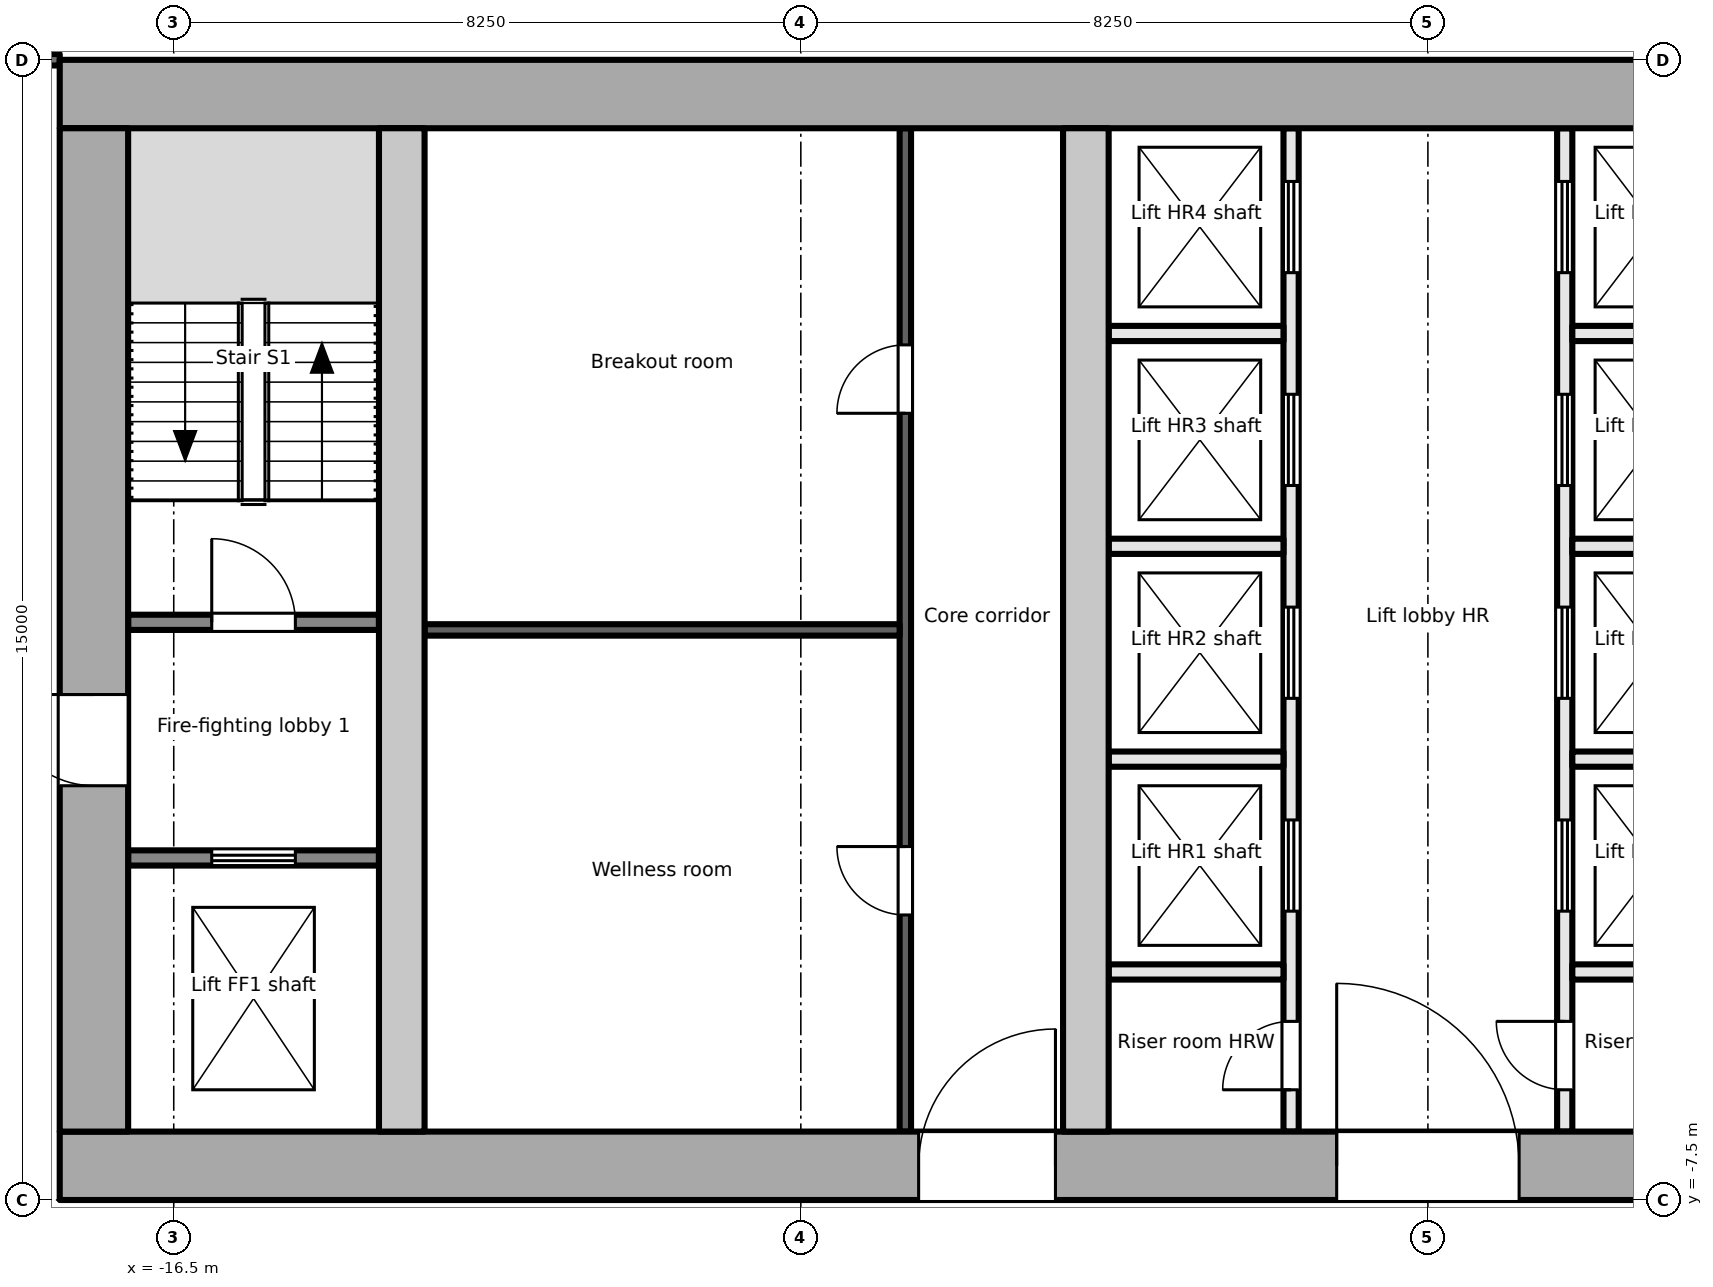
"""IFC4 building model, lengths in metres.
Left out: names, types, materials, properties, quantities, classifications, styles, units other than length and angle.
Written with IfcOpenShell. Run it as: python <this file> out.ifc"""

import sys

from ifc_helpers import new_model, si_unit, direction, frame, frame_2d, origin, place, context, subcontext, project, spatial, rectangle, extrude, element, fill, save


model = new_model("IFC4")
c1 = context("Model", 3, precision=1e-05, world=origin(), true_north=direction((0.0, 1.0)))
c2 = subcontext(c1, "Body", "Model", "MODEL_VIEW")
j1 = project(units=[si_unit("LENGTHUNIT", "METRE"), si_unit("PLANEANGLEUNIT", "RADIAN")], contexts=[c1])
p1 = place(None, origin())
s1 = spatial("IfcSite", under=j1, at=p1, CompositionType="ELEMENT")
p2 = place(p1, origin())
s2 = spatial("IfcBuilding", under=s1, at=p2, CompositionType="ELEMENT")
p3 = place(p2, frame((0.0, 0.0, 270.7)))
s3 = spatial("IfcBuildingStorey", under=s2, at=p3, CompositionType="ELEMENT", Elevation=270.7)
p4 = place(p3, frame((-18.0, -7.05, -0.2), z_axis=(0.0, 0.0, 1.0), x_axis=(1.0, 0.0, 0.0)))
e1 = element("IfcWall", 1, at=p4, inside=s3, PredefinedType="SHEAR", context=c2, shape_type="SweptSolid", body=[
    extrude(rectangle(XDim=36.0, YDim=0.9, at=frame_2d((18.0, 0.0))), origin(), (0.0, 0.0, 1.0), 3.9),
])
p5 = place(p4, frame((11.3, 0.0, 0.2)))
e2 = element("IfcOpeningElement", 2, at=p5, cuts=e1, PredefinedType="OPENING", context=c2, shape_type="SweptSolid", body=[
    extrude(rectangle(XDim=1.8, YDim=2.1, at=frame_2d((0.9, 1.05))), frame((0.0, 0.46, 0.0), z_axis=(0.0, -1.0, 0.0), x_axis=(1.0, 0.0, 0.0)), (0.0, 0.0, 1.0), 0.921),
])
p6 = place(p4, frame((16.8, 0.0, 0.2)))
e3 = element("IfcOpeningElement", 3, at=p6, cuts=e1, PredefinedType="OPENING", context=c2, shape_type="SweptSolid", body=[
    extrude(rectangle(XDim=2.4, YDim=2.1, at=frame_2d((1.2, 1.05))), frame((0.0, 0.46, 0.0), z_axis=(0.0, -1.0, 0.0), x_axis=(1.0, 0.0, 0.0)), (0.0, 0.0, 1.0), 0.921),
])
p7 = place(p4, frame((26.1, 0.0, 0.2)))
e4 = element("IfcOpeningElement", 4, at=p7, cuts=e1, PredefinedType="OPENING", context=c2, shape_type="SweptSolid", body=[
    extrude(rectangle(XDim=2.4, YDim=2.1, at=frame_2d((1.2, 1.05))), frame((0.0, 0.46, 0.0), z_axis=(0.0, -1.0, 0.0), x_axis=(1.0, 0.0, 0.0)), (0.0, 0.0, 1.0), 0.921),
])
p8 = place(p3, frame((-18.0, 7.05, -0.2), z_axis=(0.0, 0.0, 1.0), x_axis=(1.0, 0.0, 0.0)))
e5 = element("IfcWall", 5, at=p8, inside=s3, PredefinedType="SHEAR", context=c2, shape_type="SweptSolid", body=[
    extrude(rectangle(XDim=36.0, YDim=0.9, at=frame_2d((18.0, 0.0))), origin(), (0.0, 0.0, 1.0), 3.9),
])
p9 = place(p3, frame((-17.55, -6.6, -0.2), z_axis=(0.0, 0.0, 1.0), x_axis=(0.0, 1.0, 0.0)))
e6 = element("IfcWall", 6, at=p9, inside=s3, PredefinedType="SHEAR", context=c2, shape_type="SweptSolid", body=[
    extrude(rectangle(XDim=13.2, YDim=0.9, at=frame_2d((6.6, 0.0))), origin(), (0.0, 0.0, 1.0), 3.9),
])
p10 = place(p9, frame((4.55, 0.0, 0.2)))
e7 = element("IfcOpeningElement", 7, at=p10, cuts=e6, PredefinedType="OPENING", context=c2, shape_type="SweptSolid", body=[
    extrude(rectangle(XDim=1.2, YDim=2.1, at=frame_2d((0.6, 1.05))), frame((0.0, 0.46, 0.0), z_axis=(0.0, -1.0, 0.0), x_axis=(1.0, 0.0, 0.0)), (0.0, 0.0, 1.0), 0.921),
])
for number, where, z_axis, x_axis in (
    (8, (-13.5, -6.6, -0.2), (0.0, 0.0, 1.0), (0.0, 1.0, 0.0)),
    (9, (-4.5, -6.6, -0.2), (0.0, 0.0, 1.0), (0.0, 1.0, 0.0)),
):
    element("IfcWall", number, at=place(p3, frame(where, z_axis=z_axis, x_axis=x_axis)), inside=s3, PredefinedType="SHEAR", context=c2, shape_type="SweptSolid", body=[
        extrude(rectangle(XDim=13.2, YDim=0.6, at=frame_2d((6.6, 0.0))), origin(), (0.0, 0.0, 1.0), 3.9),
    ])
p11 = place(p3, frame((-17.1, -3.0, 0.0), z_axis=(0.0, 0.0, 1.0), x_axis=(1.0, 0.0, 0.0)))
e10 = element("IfcWall", 10, at=p11, inside=s3, PredefinedType="PARTITIONING", context=c2, shape_type="SweptSolid", body=[
    extrude(rectangle(XDim=3.3, YDim=0.2, at=frame_2d((1.65, 0.0))), origin(), (0.0, 0.0, 1.0), 3.7),
])
p12 = place(p11, frame((1.1, 0.0, 0.0)))
e11 = element("IfcOpeningElement", 11, at=p12, cuts=e10, PredefinedType="OPENING", context=c2, shape_type="SweptSolid", body=[
    extrude(rectangle(XDim=1.1, YDim=2.1, at=frame_2d((0.55, 1.05))), frame((0.0, 0.111, 0.0), z_axis=(0.0, -1.0, 0.0), x_axis=(1.0, 0.0, 0.0)), (0.0, 0.0, 1.0), 0.221),
])
p13 = place(p3, frame((-17.1, 0.1, 0.0), z_axis=(0.0, 0.0, 1.0), x_axis=(1.0, 0.0, 0.0)))
e12 = element("IfcWall", 12, at=p13, inside=s3, PredefinedType="PARTITIONING", context=c2, shape_type="SweptSolid", body=[
    extrude(rectangle(XDim=3.3, YDim=0.2, at=frame_2d((1.65, 0.0))), origin(), (0.0, 0.0, 1.0), 3.7),
])
p14 = place(p13, frame((1.1, 0.0, 0.0)))
e13 = element("IfcOpeningElement", 13, at=p14, cuts=e12, PredefinedType="OPENING", context=c2, shape_type="SweptSolid", body=[
    extrude(rectangle(XDim=1.1, YDim=2.1, at=frame_2d((0.55, 1.05))), frame((0.0, 0.111, 0.0), z_axis=(0.0, -1.0, 0.0), x_axis=(1.0, 0.0, 0.0)), (0.0, 0.0, 1.0), 0.221),
])
p15 = place(p3, frame((-6.875, -6.6, 0.0), z_axis=(0.0, 0.0, 1.0), x_axis=(0.0, 1.0, 0.0)))
e14 = element("IfcWall", 14, at=p15, inside=s3, PredefinedType="PARTITIONING", context=c2, shape_type="SweptSolid", body=[
    extrude(rectangle(XDim=13.2, YDim=0.15, at=frame_2d((6.6, 0.0))), origin(), (0.0, 0.0, 1.0), 3.7),
])
p16 = place(p15, frame((2.85, 0.0, 0.0)))
e15 = element("IfcOpeningElement", 15, at=p16, cuts=e14, PredefinedType="OPENING", context=c2, shape_type="SweptSolid", body=[
    extrude(rectangle(XDim=0.9, YDim=2.1, at=frame_2d((0.45, 1.05))), frame((0.0, 0.085, 0.0), z_axis=(0.0, -1.0, 0.0), x_axis=(1.0, 0.0, 0.0)), (0.0, 0.0, 1.0), 0.171),
])
p17 = place(p15, frame((9.45, 0.0, 0.0)))
e16 = element("IfcOpeningElement", 16, at=p17, cuts=e14, PredefinedType="OPENING", context=c2, shape_type="SweptSolid", body=[
    extrude(rectangle(XDim=0.9, YDim=2.1, at=frame_2d((0.45, 1.05))), frame((0.0, 0.085, 0.0), z_axis=(0.0, -1.0, 0.0), x_axis=(1.0, 0.0, 0.0)), (0.0, 0.0, 1.0), 0.171),
])
p18 = place(p3, frame((-13.2, 0.0, 0.0), z_axis=(0.0, 0.0, 1.0), x_axis=(1.0, 0.0, 0.0)))
e17 = element("IfcWall", 17, at=p18, inside=s3, PredefinedType="PARTITIONING", context=c2, shape_type="SweptSolid", body=[
    extrude(rectangle(XDim=6.25, YDim=0.15, at=frame_2d((3.125, 0.0))), origin(), (0.0, 0.0, 1.0), 3.7),
])
p19 = place(p3, frame((-1.8, -6.6, 0.0), z_axis=(0.0, 0.0, 1.0), x_axis=(0.0, 1.0, 0.0)))
e18 = element("IfcWall", 18, at=p19, inside=s3, PredefinedType="PARTITIONING", context=c2, shape_type="SweptSolid", body=[
    extrude(rectangle(XDim=13.2, YDim=0.2, at=frame_2d((6.6, 0.0))), origin(), (0.0, 0.0, 1.0), 3.7),
])
p20 = place(p19, frame((0.55, 0.0, 0.0)))
e19 = element("IfcOpeningElement", 19, at=p20, cuts=e18, PredefinedType="OPENING", context=c2, shape_type="SweptSolid", body=[
    extrude(rectangle(XDim=0.9, YDim=2.1, at=frame_2d((0.45, 1.05))), frame((0.0, 0.111, 0.0), z_axis=(0.0, -1.0, 0.0), x_axis=(1.0, 0.0, 0.0)), (0.0, 0.0, 1.0), 0.221),
])
p21 = place(p19, frame((2.9, 0.0, 0.0)))
e20 = element("IfcOpeningElement", 20, at=p21, cuts=e18, PredefinedType="OPENING", context=c2, shape_type="SweptSolid", body=[
    extrude(rectangle(XDim=1.2, YDim=2.1, at=frame_2d((0.6, 1.05))), frame((0.0, 0.111, 0.0), z_axis=(0.0, -1.0, 0.0), x_axis=(1.0, 0.0, 0.0)), (0.0, 0.0, 1.0), 0.221),
])
p22 = place(p19, frame((5.7, 0.0, 0.0)))
e21 = element("IfcOpeningElement", 21, at=p22, cuts=e18, PredefinedType="OPENING", context=c2, shape_type="SweptSolid", body=[
    extrude(rectangle(XDim=1.2, YDim=2.1, at=frame_2d((0.6, 1.05))), frame((0.0, 0.111, 0.0), z_axis=(0.0, -1.0, 0.0), x_axis=(1.0, 0.0, 0.0)), (0.0, 0.0, 1.0), 0.221),
])
p23 = place(p19, frame((8.5, 0.0, 0.0)))
e22 = element("IfcOpeningElement", 22, at=p23, cuts=e18, PredefinedType="OPENING", context=c2, shape_type="SweptSolid", body=[
    extrude(rectangle(XDim=1.2, YDim=2.1, at=frame_2d((0.6, 1.05))), frame((0.0, 0.111, 0.0), z_axis=(0.0, -1.0, 0.0), x_axis=(1.0, 0.0, 0.0)), (0.0, 0.0, 1.0), 0.221),
])
p24 = place(p19, frame((11.3, 0.0, 0.0)))
e23 = element("IfcOpeningElement", 23, at=p24, cuts=e18, PredefinedType="OPENING", context=c2, shape_type="SweptSolid", body=[
    extrude(rectangle(XDim=1.2, YDim=2.1, at=frame_2d((0.6, 1.05))), frame((0.0, 0.111, 0.0), z_axis=(0.0, -1.0, 0.0), x_axis=(1.0, 0.0, 0.0)), (0.0, 0.0, 1.0), 0.221),
])
p25 = place(p3, frame((1.8, -6.6, 0.0), z_axis=(0.0, 0.0, 1.0), x_axis=(0.0, 1.0, 0.0)))
e24 = element("IfcWall", 24, at=p25, inside=s3, PredefinedType="PARTITIONING", context=c2, shape_type="SweptSolid", body=[
    extrude(rectangle(XDim=13.2, YDim=0.2, at=frame_2d((6.6, 0.0))), origin(), (0.0, 0.0, 1.0), 3.7),
])
p26 = place(p25, frame((0.55, 0.0, 0.0)))
e25 = element("IfcOpeningElement", 25, at=p26, cuts=e24, PredefinedType="OPENING", context=c2, shape_type="SweptSolid", body=[
    extrude(rectangle(XDim=0.9, YDim=2.1, at=frame_2d((0.45, 1.05))), frame((0.0, 0.111, 0.0), z_axis=(0.0, -1.0, 0.0), x_axis=(1.0, 0.0, 0.0)), (0.0, 0.0, 1.0), 0.221),
])
p27 = place(p25, frame((2.9, 0.0, 0.0)))
e26 = element("IfcOpeningElement", 26, at=p27, cuts=e24, PredefinedType="OPENING", context=c2, shape_type="SweptSolid", body=[
    extrude(rectangle(XDim=1.2, YDim=2.1, at=frame_2d((0.6, 1.05))), frame((0.0, 0.111, 0.0), z_axis=(0.0, -1.0, 0.0), x_axis=(1.0, 0.0, 0.0)), (0.0, 0.0, 1.0), 0.221),
])
p28 = place(p25, frame((5.7, 0.0, 0.0)))
e27 = element("IfcOpeningElement", 27, at=p28, cuts=e24, PredefinedType="OPENING", context=c2, shape_type="SweptSolid", body=[
    extrude(rectangle(XDim=1.2, YDim=2.1, at=frame_2d((0.6, 1.05))), frame((0.0, 0.111, 0.0), z_axis=(0.0, -1.0, 0.0), x_axis=(1.0, 0.0, 0.0)), (0.0, 0.0, 1.0), 0.221),
])
p29 = place(p25, frame((8.5, 0.0, 0.0)))
e28 = element("IfcOpeningElement", 28, at=p29, cuts=e24, PredefinedType="OPENING", context=c2, shape_type="SweptSolid", body=[
    extrude(rectangle(XDim=1.2, YDim=2.1, at=frame_2d((0.6, 1.05))), frame((0.0, 0.111, 0.0), z_axis=(0.0, -1.0, 0.0), x_axis=(1.0, 0.0, 0.0)), (0.0, 0.0, 1.0), 0.221),
])
p30 = place(p25, frame((11.3, 0.0, 0.0)))
e29 = element("IfcOpeningElement", 29, at=p30, cuts=e24, PredefinedType="OPENING", context=c2, shape_type="SweptSolid", body=[
    extrude(rectangle(XDim=1.2, YDim=2.1, at=frame_2d((0.6, 1.05))), frame((0.0, 0.111, 0.0), z_axis=(0.0, -1.0, 0.0), x_axis=(1.0, 0.0, 0.0)), (0.0, 0.0, 1.0), 0.221),
])
for number, where, z_axis, x_axis in (
    (30, (-4.2, -1.7, 0.0), (0.0, 0.0, 1.0), (1.0, 0.0, 0.0)),
    (31, (-4.2, 1.1, 0.0), (0.0, 0.0, 1.0), (1.0, 0.0, 0.0)),
    (32, (-4.2, 3.9, 0.0), (0.0, 0.0, 1.0), (1.0, 0.0, 0.0)),
    (33, (-4.2, -4.5, 0.0), (0.0, 0.0, 1.0), (1.0, 0.0, 0.0)),
    (34, (1.9, -1.7, 0.0), (0.0, 0.0, 1.0), (1.0, 0.0, 0.0)),
    (35, (1.9, 1.1, 0.0), (0.0, 0.0, 1.0), (1.0, 0.0, 0.0)),
    (36, (1.9, 3.9, 0.0), (0.0, 0.0, 1.0), (1.0, 0.0, 0.0)),
    (37, (1.9, -4.5, 0.0), (0.0, 0.0, 1.0), (1.0, 0.0, 0.0)),
):
    element("IfcWall", number, at=place(p3, frame(where, z_axis=z_axis, x_axis=x_axis)), inside=s3, PredefinedType="PARTITIONING", context=c2, shape_type="SweptSolid", body=[
        extrude(rectangle(XDim=2.3, YDim=0.2, at=frame_2d((1.15, 0.0))), origin(), (0.0, 0.0, 1.0), 3.7),
    ])
p31 = place(p3, frame((-20.625, 7.501, 0.0), z_axis=(0.0, 0.0, 1.0), x_axis=(1.0, 0.0, 0.0)))
e38 = element("IfcWall", 38, at=p31, inside=s3, PredefinedType="PARTITIONING", context=c2, shape_type="SweptSolid", body=[
    extrude(rectangle(XDim=2.625, YDim=0.15, at=frame_2d((1.312, 0.0))), origin(), (0.0, 0.0, 1.0), 3.7),
])
p32 = place(p12, origin())
e39 = element("IfcDoor", 39, at=p32, inside=s3, OperationType="DOUBLE_DOOR_SLIDING", PredefinedType="DOOR", context=c2, shape_type="SweptSolid", body=[
    extrude(rectangle(XDim=1.1, YDim=2.1, at=frame_2d((0.55, 1.05))), frame((0.0, 0.025, 0.0), z_axis=(0.0, -1.0, 0.0), x_axis=(1.0, 0.0, 0.0)), (0.0, 0.0, 1.0), 0.05),
])
fill(e11, e39)
p33 = place(p10, origin())
e40 = element("IfcDoor", 40, at=p33, inside=s3, OperationType="SINGLE_SWING_RIGHT", PredefinedType="DOOR", context=c2, shape_type="SweptSolid", body=[
    extrude(rectangle(XDim=1.2, YDim=2.1, at=frame_2d((0.6, 1.05))), frame((0.0, 0.025, 0.0), z_axis=(0.0, -1.0, 0.0), x_axis=(1.0, 0.0, 0.0)), (0.0, 0.0, 1.0), 0.05),
])
fill(e7, e40)
p34 = place(p14, origin())
e41 = element("IfcDoor", 41, at=p34, inside=s3, OperationType="SINGLE_SWING_LEFT", PredefinedType="DOOR", context=c2, shape_type="SweptSolid", body=[
    extrude(rectangle(XDim=1.1, YDim=2.1, at=frame_2d((0.55, 1.05))), frame((0.0, 0.025, 0.0), z_axis=(0.0, -1.0, 0.0), x_axis=(1.0, 0.0, 0.0)), (0.0, 0.0, 1.0), 0.05),
])
fill(e13, e41)
p35 = place(p16, origin())
e42 = element("IfcDoor", 42, at=p35, inside=s3, OperationType="SINGLE_SWING_RIGHT", PredefinedType="DOOR", context=c2, shape_type="SweptSolid", body=[
    extrude(rectangle(XDim=0.9, YDim=2.1, at=frame_2d((0.45, 1.05))), frame((0.0, 0.025, 0.0), z_axis=(0.0, -1.0, 0.0), x_axis=(1.0, 0.0, 0.0)), (0.0, 0.0, 1.0), 0.05),
])
fill(e15, e42)
p36 = place(p17, origin())
e43 = element("IfcDoor", 43, at=p36, inside=s3, OperationType="SINGLE_SWING_LEFT", PredefinedType="DOOR", context=c2, shape_type="SweptSolid", body=[
    extrude(rectangle(XDim=0.9, YDim=2.1, at=frame_2d((0.45, 1.05))), frame((0.0, 0.025, 0.0), z_axis=(0.0, -1.0, 0.0), x_axis=(1.0, 0.0, 0.0)), (0.0, 0.0, 1.0), 0.05),
])
fill(e16, e43)
p37 = place(p5, origin())
e44 = element("IfcDoor", 44, at=p37, inside=s3, OperationType="SINGLE_SWING_RIGHT", PredefinedType="DOOR", context=c2, shape_type="SweptSolid", body=[
    extrude(rectangle(XDim=1.8, YDim=2.1, at=frame_2d((0.9, 1.05))), frame((0.0, 0.025, 0.0), z_axis=(0.0, -1.0, 0.0), x_axis=(1.0, 0.0, 0.0)), (0.0, 0.0, 1.0), 0.05),
])
fill(e2, e44)
p38 = place(p20, origin())
e45 = element("IfcDoor", 45, at=p38, inside=s3, OperationType="SINGLE_SWING_LEFT", PredefinedType="DOOR", context=c2, shape_type="SweptSolid", body=[
    extrude(rectangle(XDim=0.9, YDim=2.1, at=frame_2d((0.45, 1.05))), frame((0.0, 0.025, 0.0), z_axis=(0.0, -1.0, 0.0), x_axis=(1.0, 0.0, 0.0)), (0.0, 0.0, 1.0), 0.05),
])
fill(e19, e45)
p39 = place(p21, origin())
e46 = element("IfcDoor", 46, at=p39, inside=s3, OperationType="DOUBLE_DOOR_SLIDING", PredefinedType="DOOR", context=c2, shape_type="SweptSolid", body=[
    extrude(rectangle(XDim=1.2, YDim=2.1, at=frame_2d((0.6, 1.05))), frame((0.0, 0.025, 0.0), z_axis=(0.0, -1.0, 0.0), x_axis=(1.0, 0.0, 0.0)), (0.0, 0.0, 1.0), 0.05),
])
fill(e20, e46)
p40 = place(p22, origin())
e47 = element("IfcDoor", 47, at=p40, inside=s3, OperationType="DOUBLE_DOOR_SLIDING", PredefinedType="DOOR", context=c2, shape_type="SweptSolid", body=[
    extrude(rectangle(XDim=1.2, YDim=2.1, at=frame_2d((0.6, 1.05))), frame((0.0, 0.025, 0.0), z_axis=(0.0, -1.0, 0.0), x_axis=(1.0, 0.0, 0.0)), (0.0, 0.0, 1.0), 0.05),
])
fill(e21, e47)
p41 = place(p23, origin())
e48 = element("IfcDoor", 48, at=p41, inside=s3, OperationType="DOUBLE_DOOR_SLIDING", PredefinedType="DOOR", context=c2, shape_type="SweptSolid", body=[
    extrude(rectangle(XDim=1.2, YDim=2.1, at=frame_2d((0.6, 1.05))), frame((0.0, 0.025, 0.0), z_axis=(0.0, -1.0, 0.0), x_axis=(1.0, 0.0, 0.0)), (0.0, 0.0, 1.0), 0.05),
])
fill(e22, e48)
p42 = place(p24, origin())
e49 = element("IfcDoor", 49, at=p42, inside=s3, OperationType="DOUBLE_DOOR_SLIDING", PredefinedType="DOOR", context=c2, shape_type="SweptSolid", body=[
    extrude(rectangle(XDim=1.2, YDim=2.1, at=frame_2d((0.6, 1.05))), frame((0.0, 0.025, 0.0), z_axis=(0.0, -1.0, 0.0), x_axis=(1.0, 0.0, 0.0)), (0.0, 0.0, 1.0), 0.05),
])
fill(e23, e49)
p43 = place(p26, origin())
e50 = element("IfcDoor", 50, at=p43, inside=s3, OperationType="SINGLE_SWING_RIGHT", PredefinedType="DOOR", context=c2, shape_type="SweptSolid", body=[
    extrude(rectangle(XDim=0.9, YDim=2.1, at=frame_2d((0.45, 1.05))), frame((0.0, 0.025, 0.0), z_axis=(0.0, -1.0, 0.0), x_axis=(1.0, 0.0, 0.0)), (0.0, 0.0, 1.0), 0.05),
])
fill(e25, e50)
p44 = place(p27, origin())
e51 = element("IfcDoor", 51, at=p44, inside=s3, OperationType="DOUBLE_DOOR_SLIDING", PredefinedType="DOOR", context=c2, shape_type="SweptSolid", body=[
    extrude(rectangle(XDim=1.2, YDim=2.1, at=frame_2d((0.6, 1.05))), frame((0.0, 0.025, 0.0), z_axis=(0.0, -1.0, 0.0), x_axis=(1.0, 0.0, 0.0)), (0.0, 0.0, 1.0), 0.05),
])
fill(e26, e51)
p45 = place(p28, origin())
e52 = element("IfcDoor", 52, at=p45, inside=s3, OperationType="DOUBLE_DOOR_SLIDING", PredefinedType="DOOR", context=c2, shape_type="SweptSolid", body=[
    extrude(rectangle(XDim=1.2, YDim=2.1, at=frame_2d((0.6, 1.05))), frame((0.0, 0.025, 0.0), z_axis=(0.0, -1.0, 0.0), x_axis=(1.0, 0.0, 0.0)), (0.0, 0.0, 1.0), 0.05),
])
fill(e27, e52)
p46 = place(p29, origin())
e53 = element("IfcDoor", 53, at=p46, inside=s3, OperationType="DOUBLE_DOOR_SLIDING", PredefinedType="DOOR", context=c2, shape_type="SweptSolid", body=[
    extrude(rectangle(XDim=1.2, YDim=2.1, at=frame_2d((0.6, 1.05))), frame((0.0, 0.025, 0.0), z_axis=(0.0, -1.0, 0.0), x_axis=(1.0, 0.0, 0.0)), (0.0, 0.0, 1.0), 0.05),
])
fill(e28, e53)
p47 = place(p30, origin())
e54 = element("IfcDoor", 54, at=p47, inside=s3, OperationType="DOUBLE_DOOR_SLIDING", PredefinedType="DOOR", context=c2, shape_type="SweptSolid", body=[
    extrude(rectangle(XDim=1.2, YDim=2.1, at=frame_2d((0.6, 1.05))), frame((0.0, 0.025, 0.0), z_axis=(0.0, -1.0, 0.0), x_axis=(1.0, 0.0, 0.0)), (0.0, 0.0, 1.0), 0.05),
])
fill(e29, e54)
p48 = place(p6, origin())
e55 = element("IfcDoor", 55, at=p48, inside=s3, OperationType="DOUBLE_DOOR_DOUBLE_SWING", PredefinedType="DOOR", context=c2, shape_type="SweptSolid", body=[
    extrude(rectangle(XDim=2.4, YDim=2.1, at=frame_2d((1.2, 1.05))), frame((0.0, 0.025, 0.0), z_axis=(0.0, -1.0, 0.0), x_axis=(1.0, 0.0, 0.0)), (0.0, 0.0, 1.0), 0.05),
])
fill(e3, e55)
save(model, sys.argv[1])
